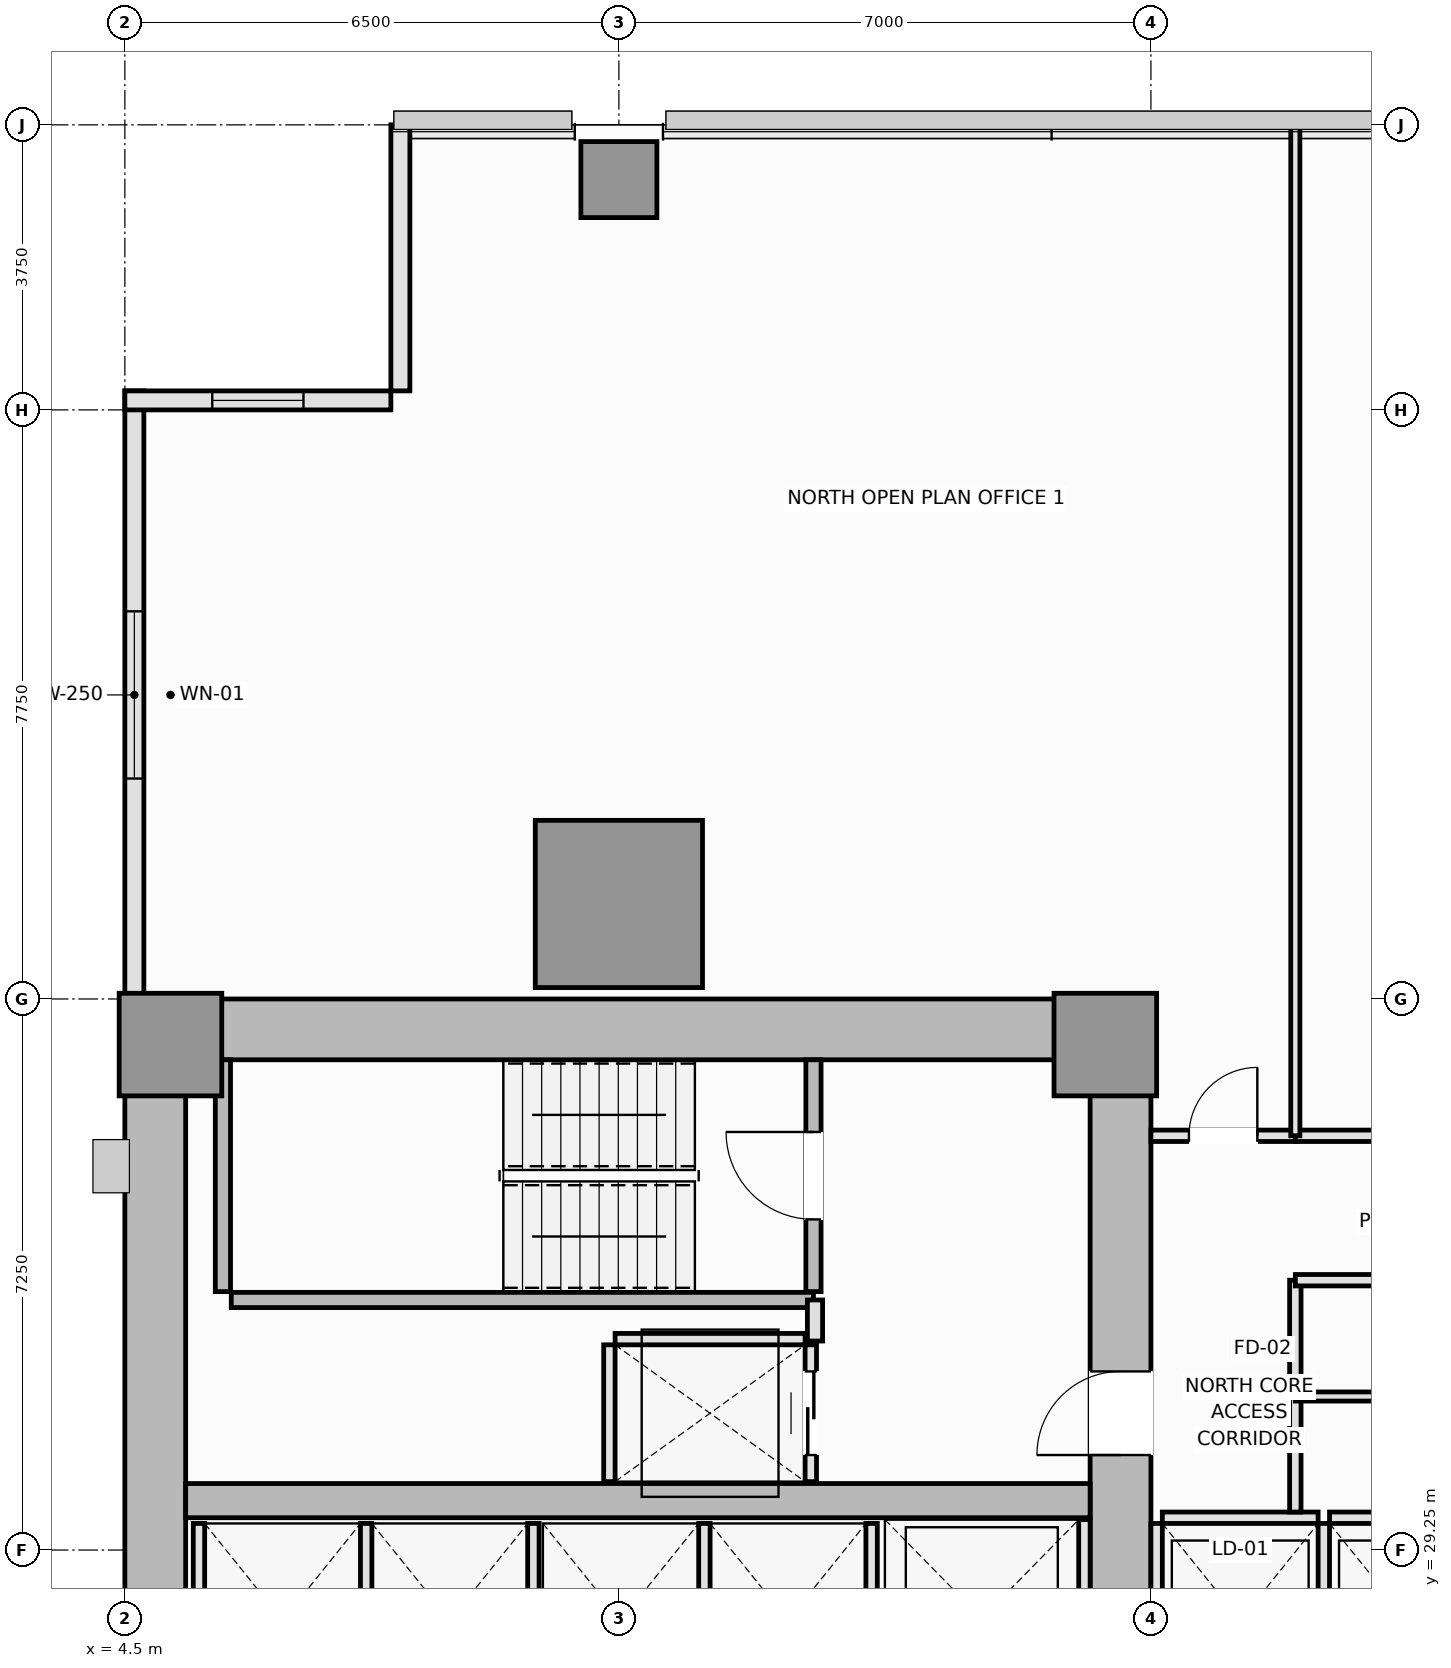
"""IFC4 building model, lengths in metres.
Left out: names, types, materials, properties, quantities, classifications, styles, units other than length and angle.
Written with IfcOpenShell. Run it as: python <this file> out.ifc"""

import sys

from ifc_helpers import new_model, si_unit, direction, frame, frame_2d, origin, origin_2d, place, context, subcontext, project, spatial, rectangle, extrude, element, fill, save


model = new_model("IFC4")
c1 = context("Model", 3, precision=1e-05, world=origin(), true_north=direction((0.0, 1.0)))
c2 = subcontext(c1, "Body", "Model", "MODEL_VIEW")
j1 = project(units=[si_unit("LENGTHUNIT", "METRE"), si_unit("PLANEANGLEUNIT", "RADIAN")], contexts=[c1])
p1 = place(None, origin())
s1 = spatial("IfcSite", under=j1, at=p1, CompositionType="ELEMENT")
p2 = place(p1, origin())
s2 = spatial("IfcBuilding", under=s1, at=p2, CompositionType="ELEMENT")
p3 = place(p2, frame((0.0, 0.0, 68.2)))
s3 = spatial("IfcBuildingStorey", under=s2, at=p3, CompositionType="ELEMENT", Elevation=68.2)
p4 = place(p3, frame((4.5, 36.1, 0.0), z_axis=(0.0, 0.0, 1.0), x_axis=(1.0, 0.0, 0.0)))
e1 = element("IfcWall", 1, at=p4, inside=s3, PredefinedType="SHEAR", context=c2, shape_type="SweptSolid", body=[
    extrude(rectangle(XDim=13.5, YDim=0.8, at=frame_2d((6.75, 0.0))), origin(), (0.0, 0.0, 1.0), 3.55),
])
p5 = place(p3, frame((4.9, 14.8, 0.0), z_axis=(0.0, 0.0, 1.0), x_axis=(0.0, 1.0, 0.0)))
e2 = element("IfcWall", 2, at=p5, inside=s3, PredefinedType="SHEAR", context=c2, shape_type="SweptSolid", body=[
    extrude(rectangle(XDim=20.9, YDim=0.8, at=frame_2d((10.45, 0.0))), origin(), (0.0, 0.0, 1.0), 3.55),
])
p6 = place(p3, frame((17.6, 27.05, 0.0), z_axis=(0.0, 0.0, 1.0), x_axis=(0.0, 1.0, 0.0)))
e3 = element("IfcWall", 3, at=p6, inside=s3, PredefinedType="SHEAR", context=c2, shape_type="SweptSolid", body=[
    extrude(rectangle(XDim=8.65, YDim=0.8, at=frame_2d((4.325, 0.0))), origin(), (0.0, 0.0, 1.0), 3.55),
])
p7 = place(p6, frame((3.45, 0.0, 0.0)))
e4 = element("IfcOpeningElement", 4, at=p7, cuts=e3, PredefinedType="OPENING", context=c2, shape_type="SweptSolid", body=[
    extrude(rectangle(XDim=1.1, YDim=2.15, at=frame_2d((0.55, 1.075))), frame((0.0, 0.41, 0.0), z_axis=(0.0, -1.0, 0.0), x_axis=(1.0, 0.0, 0.0)), (0.0, 0.0, 1.0), 0.82),
])
p8 = place(p3, frame((5.3, 29.9, 0.0), z_axis=(0.0, 0.0, 1.0), x_axis=(1.0, 0.0, 0.0)))
e5 = element("IfcWall", 5, at=p8, inside=s3, PredefinedType="SHEAR", context=c2, shape_type="SweptSolid", body=[
    extrude(rectangle(XDim=11.9, YDim=0.45, at=frame_2d((5.95, 0.0))), origin(), (0.0, 0.0, 1.0), 3.55),
])
for number, where, z_axis, x_axis in (
    (6, (5.1, 35.9, 0.0), (0.0, 0.0, 1.0), (1.0, 0.0, 0.0)),
    (7, (17.4, 35.9, 0.0), (0.0, 0.0, 1.0), (1.0, 0.0, 0.0)),
):
    element("IfcColumn", number, at=place(p3, frame(where, z_axis=z_axis, x_axis=x_axis)), inside=s3, PredefinedType="PILASTER", context=c2, shape_type="SweptSolid", body=[
        extrude(rectangle(XDim=1.35, YDim=1.35, at=origin_2d()), origin(), (0.0, 0.0, 1.0), 3.55),
    ])
p9 = place(p3, frame((11.0, 37.75, 0.0), z_axis=(0.0, 0.0, 1.0), x_axis=(1.0, 0.0, 0.0)))
e8 = element("IfcColumn", 8, at=p9, inside=s3, PredefinedType="COLUMN", context=c2, shape_type="SweptSolid", body=[
    extrude(rectangle(XDim=2.2, YDim=2.2, at=origin_2d()), origin(), (0.0, 0.0, 1.0), 3.55),
])
p10 = place(p3, frame((11.0, 47.28, 0.0), z_axis=(0.0, 0.0, 1.0), x_axis=(1.0, 0.0, 0.0)))
e9 = element("IfcColumn", 9, at=p10, inside=s3, PredefinedType="COLUMN", context=c2, shape_type="SweptSolid", body=[
    extrude(rectangle(XDim=1.0, YDim=1.0, at=origin_2d()), origin(), (0.0, 0.0, 1.0), 3.55),
])
p11 = place(p3, frame((4.625, 44.5, 0.0), z_axis=(0.0, 0.0, 1.0), x_axis=(0.0, -1.0, 0.0)))
e10 = element("IfcWall", 10, at=p11, inside=s3, PredefinedType="SOLIDWALL", context=c2, shape_type="SweptSolid", body=[
    extrude(rectangle(XDim=8.0, YDim=0.25, at=frame_2d((4.0, 0.0))), origin(), (0.0, 0.0, 1.0), 3.37),
])
p12 = place(p11, frame((2.9, 0.0, 0.9)))
e11 = element("IfcOpeningElement", 11, at=p12, cuts=e10, PredefinedType="OPENING", context=c2, shape_type="SweptSolid", body=[
    extrude(rectangle(XDim=2.2, YDim=1.8, at=frame_2d((1.1, 0.9))), frame((0.0, 0.135, 0.0), z_axis=(0.0, -1.0, 0.0), x_axis=(1.0, 0.0, 0.0)), (0.0, 0.0, 1.0), 0.27),
])
p13 = place(p3, frame((8.125, 48.0, 0.0), z_axis=(0.0, 0.0, 1.0), x_axis=(0.0, -1.0, 0.0)))
e12 = element("IfcWall", 12, at=p13, inside=s3, PredefinedType="SOLIDWALL", context=c2, shape_type="SweptSolid", body=[
    extrude(rectangle(XDim=3.5, YDim=0.25, at=frame_2d((1.75, 0.0))), origin(), (0.0, 0.0, 1.0), 3.37),
])
p14 = place(p3, frame((8.0, 44.375, 0.0), z_axis=(0.0, 0.0, 1.0), x_axis=(-1.0, 0.0, 0.0)))
e13 = element("IfcWall", 13, at=p14, inside=s3, PredefinedType="SOLIDWALL", context=c2, shape_type="SweptSolid", body=[
    extrude(rectangle(XDim=3.5, YDim=0.25, at=frame_2d((1.75, 0.0))), origin(), (0.0, 0.0, 1.0), 3.37),
])
p15 = place(p14, frame((1.15, 0.0, 0.9)))
e14 = element("IfcOpeningElement", 14, at=p15, cuts=e13, PredefinedType="OPENING", context=c2, shape_type="SweptSolid", body=[
    extrude(rectangle(XDim=1.2, YDim=1.8, at=frame_2d((0.6, 0.9))), frame((0.0, 0.135, 0.0), z_axis=(0.0, -1.0, 0.0), x_axis=(1.0, 0.0, 0.0)), (0.0, 0.0, 1.0), 0.27),
])
p16 = place(p3, frame((5.79, 32.65, 0.0), z_axis=(0.0, 0.0, 1.0), x_axis=(0.0, 1.0, 0.0)))
e15 = element("IfcWall", 15, at=p16, inside=s3, PredefinedType="SOLIDWALL", context=c2, shape_type="SweptSolid", body=[
    extrude(rectangle(XDim=3.05, YDim=0.2, at=frame_2d((1.525, 0.0))), origin(), (0.0, 0.0, 1.0), 3.55),
])
p17 = place(p3, frame((5.9, 32.54, 0.0), z_axis=(0.0, 0.0, 1.0), x_axis=(1.0, 0.0, 0.0)))
e16 = element("IfcWall", 16, at=p17, inside=s3, PredefinedType="SOLIDWALL", context=c2, shape_type="SweptSolid", body=[
    extrude(rectangle(XDim=7.66, YDim=0.2, at=frame_2d((3.83, 0.0))), origin(), (0.0, 0.0, 1.0), 3.55),
])
p18 = place(p3, frame((13.56, 32.65, 0.0), z_axis=(0.0, 0.0, 1.0), x_axis=(0.0, 1.0, 0.0)))
e17 = element("IfcWall", 17, at=p18, inside=s3, PredefinedType="SOLIDWALL", context=c2, shape_type="SweptSolid", body=[
    extrude(rectangle(XDim=3.05, YDim=0.2, at=frame_2d((1.525, 0.0))), origin(), (0.0, 0.0, 1.0), 3.55),
])
p19 = place(p18, frame((0.95, 0.0, 0.0)))
e18 = element("IfcOpeningElement", 18, at=p19, cuts=e17, PredefinedType="OPENING", context=c2, shape_type="SweptSolid", body=[
    extrude(rectangle(XDim=1.15, YDim=2.15, at=frame_2d((0.575, 1.075))), frame((0.0, 0.11, 0.0), z_axis=(0.0, -1.0, 0.0), x_axis=(1.0, 0.0, 0.0)), (0.0, 0.0, 1.0), 0.22),
])
p20 = place(p3, frame((18.15, 29.675, 0.0), z_axis=(0.0, 0.0, 1.0), x_axis=(1.0, 0.0, 0.0)))
e19 = element("IfcWall", 19, at=p20, inside=s3, PredefinedType="PARTITIONING", context=c2, shape_type="SweptSolid", body=[
    extrude(rectangle(XDim=2.05, YDim=0.15, at=frame_2d((1.025, 0.0))), origin(), (0.0, 0.0, 1.0), 3.37),
])
for number, where, z_axis, x_axis in (
    (20, (18.075, 27.05, 0.0), (0.0, 0.0, 1.0), (0.0, 1.0, 0.0)),
    (21, (20.275, 27.05, 0.0), (0.0, 0.0, 1.0), (0.0, 1.0, 0.0)),
):
    element("IfcWall", number, at=place(p3, frame(where, z_axis=z_axis, x_axis=x_axis)), inside=s3, PredefinedType="PARTITIONING", context=c2, shape_type="SweptSolid", body=[
        extrude(rectangle(XDim=2.55, YDim=0.15, at=frame_2d((1.275, 0.0))), origin(), (0.0, 0.0, 1.0), 3.37),
    ])
p21 = place(p3, frame((20.35, 29.675, 0.0), z_axis=(0.0, 0.0, 1.0), x_axis=(1.0, 0.0, 0.0)))
e22 = element("IfcWall", 22, at=p21, inside=s3, PredefinedType="PARTITIONING", context=c2, shape_type="SweptSolid", body=[
    extrude(rectangle(XDim=2.05, YDim=0.15, at=frame_2d((1.025, 0.0))), origin(), (0.0, 0.0, 1.0), 3.37),
])
for number, where, z_axis, x_axis in (
    (23, (5.475, 27.05, 0.0), (0.0, 0.0, 1.0), (0.0, 1.0, 0.0)),
    (24, (7.675, 27.05, 0.0), (0.0, 0.0, 1.0), (0.0, 1.0, 0.0)),
    (25, (9.875, 27.05, 0.0), (0.0, 0.0, 1.0), (0.0, 1.0, 0.0)),
    (26, (12.125, 27.05, 0.0), (0.0, 0.0, 1.0), (0.0, 1.0, 0.0)),
    (27, (14.325, 27.05, 0.0), (0.0, 0.0, 1.0), (0.0, 1.0, 0.0)),
):
    element("IfcWall", number, at=place(p3, frame(where, z_axis=z_axis, x_axis=x_axis)), inside=s3, PredefinedType="PARTITIONING", context=c2, shape_type="SweptSolid", body=[
        extrude(rectangle(XDim=2.55, YDim=0.15, at=frame_2d((1.275, 0.0))), origin(), (0.0, 0.0, 1.0), 3.37),
    ])
p22 = place(p3, frame((17.125, 27.05, 0.0), z_axis=(0.0, 0.0, 1.0), x_axis=(0.0, 1.0, 0.0)))
e28 = element("IfcWall", 28, at=p22, inside=s3, PredefinedType="PARTITIONING", context=c2, shape_type="SweptSolid", body=[
    extrude(rectangle(XDim=2.6, YDim=0.15, at=frame_2d((1.3, 0.0))), origin(), (0.0, 0.0, 1.0), 3.37),
])
p23 = place(p3, frame((10.95, 32.025, 0.0), z_axis=(0.0, 0.0, 1.0), x_axis=(1.0, 0.0, 0.0)))
e29 = element("IfcWall", 29, at=p23, inside=s3, PredefinedType="PARTITIONING", context=c2, shape_type="SweptSolid", body=[
    extrude(rectangle(XDim=2.5, YDim=0.15, at=frame_2d((1.25, 0.0))), origin(), (0.0, 0.0, 1.0), 3.37),
])
p24 = place(p3, frame((10.875, 30.15, 0.0), z_axis=(0.0, 0.0, 1.0), x_axis=(0.0, 1.0, 0.0)))
e30 = element("IfcWall", 30, at=p24, inside=s3, PredefinedType="PARTITIONING", context=c2, shape_type="SweptSolid", body=[
    extrude(rectangle(XDim=1.8, YDim=0.15, at=frame_2d((0.9, 0.0))), origin(), (0.0, 0.0, 1.0), 3.37),
])
p25 = place(p3, frame((13.525, 30.15, 0.0), z_axis=(0.0, 0.0, 1.0), x_axis=(0.0, 1.0, 0.0)))
e31 = element("IfcWall", 31, at=p25, inside=s3, PredefinedType="PARTITIONING", context=c2, shape_type="SweptSolid", body=[
    extrude(rectangle(XDim=1.8, YDim=0.15, at=frame_2d((0.9, 0.0))), origin(), (0.0, 0.0, 1.0), 3.37),
])
p26 = place(p25, frame((0.35, 0.0, 0.0)))
e32 = element("IfcOpeningElement", 32, at=p26, cuts=e31, PredefinedType="OPENING", context=c2, shape_type="SweptSolid", body=[
    extrude(rectangle(XDim=1.1, YDim=2.2, at=frame_2d((0.55, 1.1))), frame((0.0, 0.085, 0.0), z_axis=(0.0, -1.0, 0.0), x_axis=(1.0, 0.0, 0.0)), (0.0, 0.0, 1.0), 0.17),
])
p27 = place(p3, frame((13.58, 32.0, 0.0), z_axis=(0.0, 0.0, 1.0), x_axis=(0.0, 1.0, 0.0)))
e33 = element("IfcWall", 33, at=p27, inside=s3, PredefinedType="PARTITIONING", context=c2, shape_type="SweptSolid", body=[
    extrude(rectangle(XDim=0.54, YDim=0.2, at=frame_2d((0.27, 0.0))), origin(), (0.0, 0.0, 1.0), 3.37),
])
p28 = place(p3, frame((19.9, 29.75, 0.0), z_axis=(0.0, 0.0, 1.0), x_axis=(0.0, 1.0, 0.0)))
e34 = element("IfcWall", 34, at=p28, inside=s3, PredefinedType="PARTITIONING", context=c2, shape_type="SweptSolid", body=[
    extrude(rectangle(XDim=1.52, YDim=0.15, at=frame_2d((0.76, 0.0))), origin(), (0.0, 0.0, 1.0), 3.37),
])
p29 = place(p3, frame((19.9, 31.27, 0.0), z_axis=(0.0, 0.0, 1.0), x_axis=(0.0, 1.0, 0.0)))
e35 = element("IfcWall", 35, at=p29, inside=s3, PredefinedType="PARTITIONING", context=c2, shape_type="SweptSolid", body=[
    extrude(rectangle(XDim=1.53, YDim=0.15, at=frame_2d((0.765, 0.0))), origin(), (0.0, 0.0, 1.0), 3.37),
])
p30 = place(p3, frame((19.9, 32.8, 0.0), z_axis=(0.0, 0.0, 1.0), x_axis=(1.0, 0.0, 0.0)))
e36 = element("IfcWall", 36, at=p30, inside=s3, PredefinedType="PARTITIONING", context=c2, shape_type="SweptSolid", body=[
    extrude(rectangle(XDim=2.65, YDim=0.15, at=frame_2d((1.325, 0.0))), origin(), (0.0, 0.0, 1.0), 3.37),
])
p31 = place(p3, frame((18.0, 34.7, 0.0), z_axis=(0.0, 0.0, 1.0), x_axis=(1.0, 0.0, 0.0)))
e37 = element("IfcWall", 37, at=p31, inside=s3, PredefinedType="PARTITIONING", context=c2, shape_type="SweptSolid", body=[
    extrude(rectangle(XDim=1.9, YDim=0.15, at=frame_2d((0.95, 0.0))), origin(), (0.0, 0.0, 1.0), 3.37),
])
p32 = place(p31, frame((0.5, 0.0, 0.0)))
e38 = element("IfcOpeningElement", 38, at=p32, cuts=e37, PredefinedType="OPENING", context=c2, shape_type="SweptSolid", body=[
    extrude(rectangle(XDim=0.9, YDim=2.1, at=frame_2d((0.45, 1.05))), frame((0.0, 0.085, 0.0), z_axis=(0.0, -1.0, 0.0), x_axis=(1.0, 0.0, 0.0)), (0.0, 0.0, 1.0), 0.17),
])
p33 = place(p3, frame((19.9, 34.7, 0.0), z_axis=(0.0, 0.0, 1.0), x_axis=(1.0, 0.0, 0.0)))
e39 = element("IfcWall", 39, at=p33, inside=s3, PredefinedType="PARTITIONING", context=c2, shape_type="SweptSolid", body=[
    extrude(rectangle(XDim=7.6, YDim=0.15, at=frame_2d((3.8, 0.0))), origin(), (0.0, 0.0, 1.0), 3.37),
])
p34 = place(p33, frame((3.3, 0.0, 0.0)))
e40 = element("IfcOpeningElement", 40, at=p34, cuts=e39, PredefinedType="OPENING", context=c2, shape_type="SweptSolid", body=[
    extrude(rectangle(XDim=1.0, YDim=2.15, at=frame_2d((0.5, 1.075))), frame((0.0, 0.085, 0.0), z_axis=(0.0, -1.0, 0.0), x_axis=(1.0, 0.0, 0.0)), (0.0, 0.0, 1.0), 0.17),
])
p35 = place(p3, frame((19.9, 31.27, 0.0), z_axis=(0.0, 0.0, 1.0), x_axis=(1.0, 0.0, 0.0)))
e41 = element("IfcWall", 41, at=p35, inside=s3, PredefinedType="PARTITIONING", context=c2, shape_type="SweptSolid", body=[
    extrude(rectangle(XDim=2.65, YDim=0.12, at=frame_2d((1.325, 0.0))), origin(), (0.0, 0.0, 1.0), 3.37),
])
p36 = place(p3, frame((19.9, 34.7, 0.0), z_axis=(0.0, 0.0, 1.0), x_axis=(0.0, 1.0, 0.0)))
e42 = element("IfcWall", 42, at=p36, inside=s3, PredefinedType="PARTITIONING", context=c2, shape_type="SweptSolid", body=[
    extrude(rectangle(XDim=13.29, YDim=0.12, at=frame_2d((6.645, 0.0))), origin(), (0.0, 0.0, 1.0), 3.37),
])
p37 = place(p12, origin())
e43 = element("IfcWindow", 43, at=p37, inside=s3, PartitioningType="SINGLE_PANEL", PredefinedType="WINDOW", context=c2, shape_type="SweptSolid", body=[
    extrude(rectangle(XDim=2.2, YDim=1.8, at=frame_2d((1.1, 0.9))), frame((0.0, 0.03, 0.0), z_axis=(0.0, -1.0, 0.0), x_axis=(1.0, 0.0, 0.0)), (0.0, 0.0, 1.0), 0.06),
])
fill(e11, e43)
p38 = place(p15, origin())
e44 = element("IfcWindow", 44, at=p38, inside=s3, PartitioningType="SINGLE_PANEL", PredefinedType="WINDOW", context=c2, shape_type="SweptSolid", body=[
    extrude(rectangle(XDim=1.2, YDim=1.8, at=frame_2d((0.6, 0.9))), frame((0.0, 0.03, 0.0), z_axis=(0.0, -1.0, 0.0), x_axis=(1.0, 0.0, 0.0)), (0.0, 0.0, 1.0), 0.06),
])
fill(e14, e44)
p39 = place(p19, origin())
e45 = element("IfcDoor", 45, at=p39, inside=s3, OperationType="SINGLE_SWING_RIGHT", PredefinedType="DOOR", context=c2, shape_type="SweptSolid", body=[
    extrude(rectangle(XDim=1.15, YDim=2.15, at=frame_2d((0.575, 1.075))), frame((0.0, 0.025, 0.0), z_axis=(0.0, -1.0, 0.0), x_axis=(1.0, 0.0, 0.0)), (0.0, 0.0, 1.0), 0.05),
])
fill(e18, e45)
p40 = place(p26, origin())
e46 = element("IfcDoor", 46, at=p40, inside=s3, OperationType="DOUBLE_DOOR_SLIDING", PredefinedType="DOOR", context=c2, shape_type="SweptSolid", body=[
    extrude(rectangle(XDim=1.1, YDim=2.2, at=frame_2d((0.55, 1.1))), frame((0.0, 0.025, 0.0), z_axis=(0.0, -1.0, 0.0), x_axis=(1.0, 0.0, 0.0)), (0.0, 0.0, 1.0), 0.05),
])
fill(e32, e46)
p41 = place(p7, origin())
e47 = element("IfcDoor", 47, at=p41, inside=s3, OperationType="SINGLE_SWING_LEFT", PredefinedType="DOOR", context=c2, shape_type="SweptSolid", body=[
    extrude(rectangle(XDim=1.1, YDim=2.15, at=frame_2d((0.55, 1.075))), frame((0.0, 0.025, 0.0), z_axis=(0.0, -1.0, 0.0), x_axis=(1.0, 0.0, 0.0)), (0.0, 0.0, 1.0), 0.05),
])
fill(e4, e47)
p42 = place(p32, origin())
e48 = element("IfcDoor", 48, at=p42, inside=s3, OperationType="SINGLE_SWING_RIGHT", PredefinedType="DOOR", context=c2, shape_type="SweptSolid", body=[
    extrude(rectangle(XDim=0.9, YDim=2.1, at=frame_2d((0.45, 1.05))), frame((0.0, 0.025, 0.0), z_axis=(0.0, -1.0, 0.0), x_axis=(1.0, 0.0, 0.0)), (0.0, 0.0, 1.0), 0.05),
])
fill(e38, e48)
save(model, sys.argv[1])
